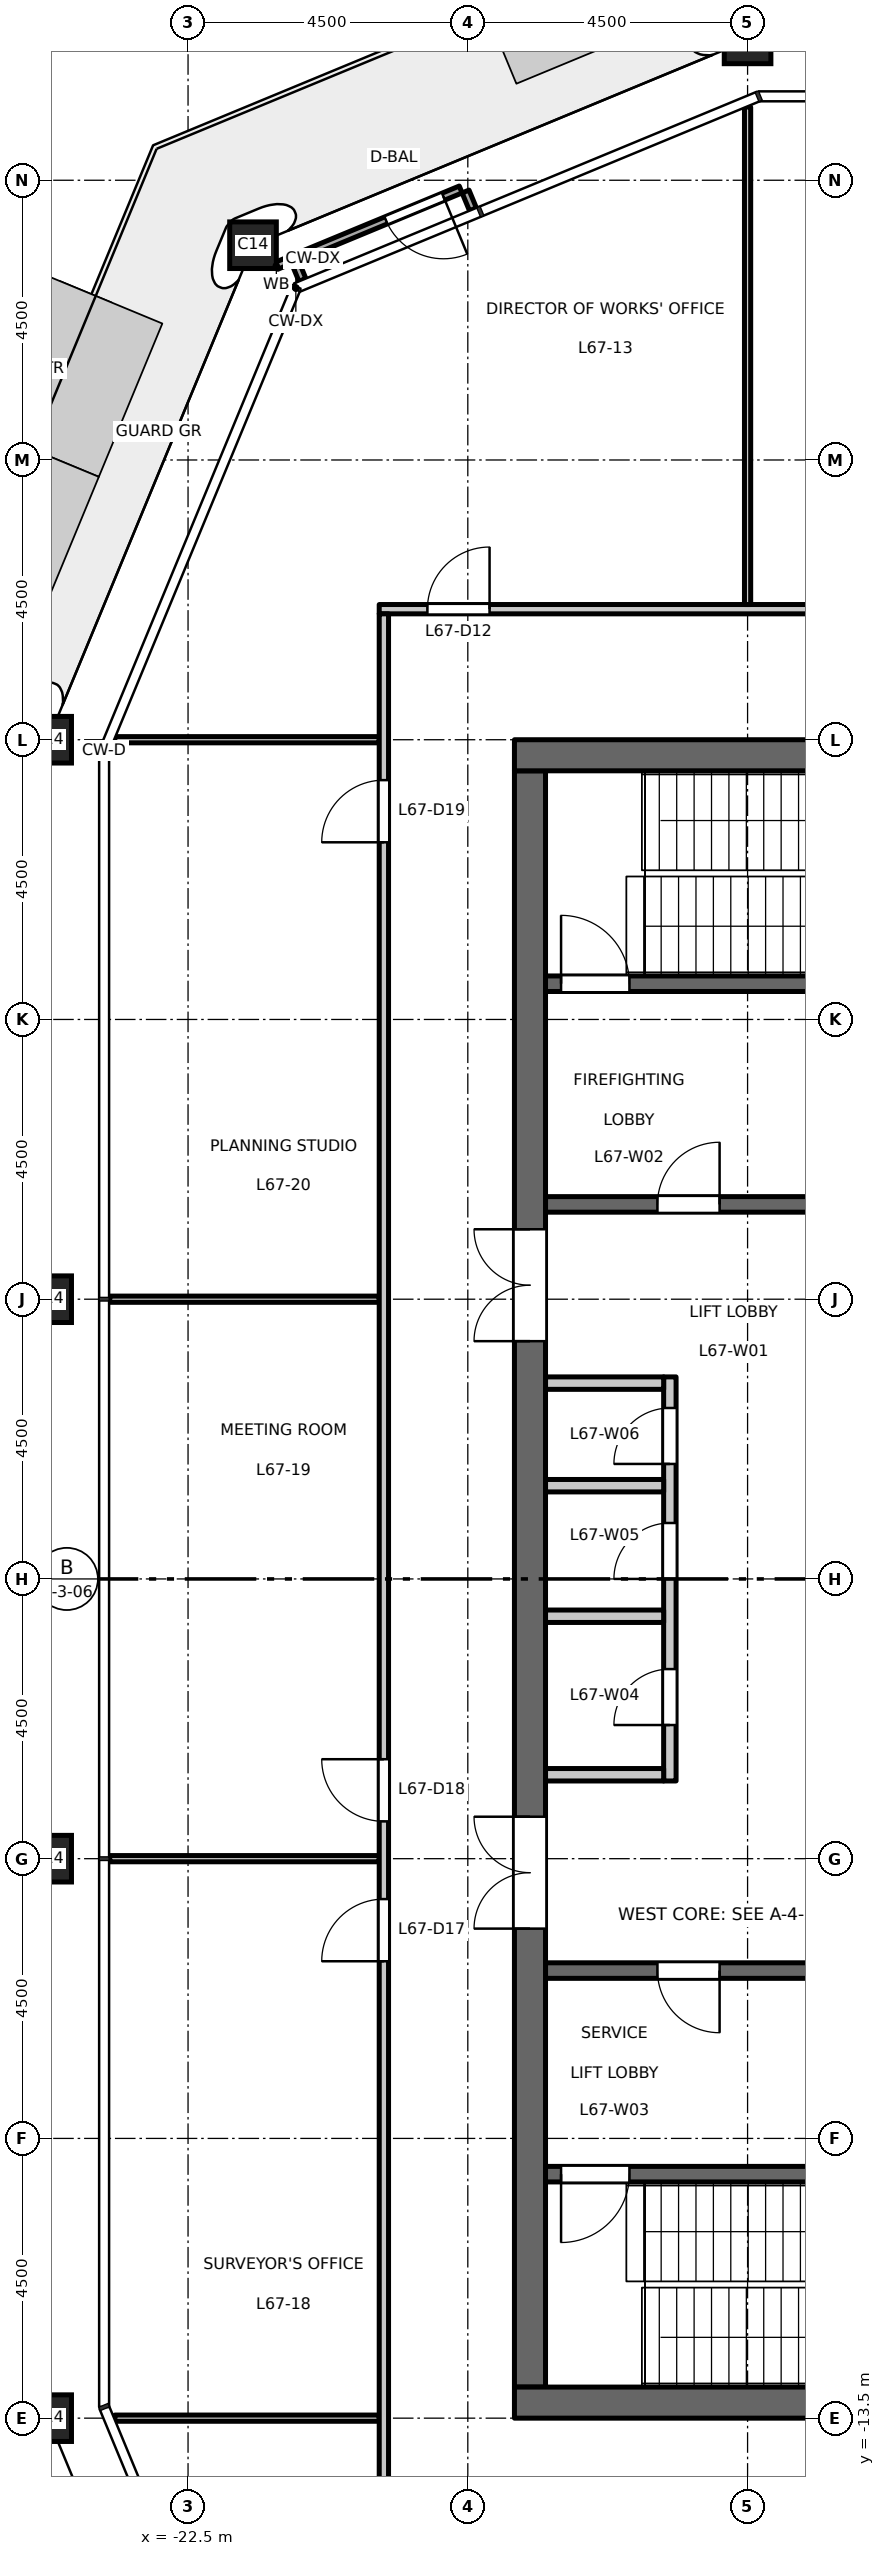
"""IFC4 building model, lengths in metres.
Left out: names, types, materials, properties, quantities, classifications, styles, units other than length and angle.
Written with IfcOpenShell. Run it as: python <this file> out.ifc"""

import sys

from ifc_helpers import new_model, si_unit, direction, frame, frame_2d, origin, origin_2d, place, context, subcontext, project, spatial, rectangle, hollow_rectangle, extrude, element, fill, save


model = new_model("IFC4")
c1 = context("Model", 3, precision=1e-05, world=origin(), true_north=direction((0.0, 1.0)))
c2 = subcontext(c1, "Body", "Model", "MODEL_VIEW")
j1 = project(units=[si_unit("LENGTHUNIT", "METRE"), si_unit("PLANEANGLEUNIT", "RADIAN")], contexts=[c1])
p1 = place(None, origin())
s1 = spatial("IfcSite", under=j1, at=p1, CompositionType="ELEMENT")
p2 = place(p1, origin())
s2 = spatial("IfcBuilding", under=s1, at=p2, CompositionType="ELEMENT")
p3 = place(p2, frame((0.0, 0.0, 312.2)))
s3 = spatial("IfcBuildingStorey", under=s2, at=p3, CompositionType="ELEMENT", Elevation=312.2)
for number, where, z_axis, x_axis in (
    (1, (-13.5, 24.75, 0.0), (0.0, 0.0, 1.0), (1.0, 0.0, 0.0)),
    (2, (-21.455, 21.455, 0.0), (0.0, 0.0, 1.0), (1.0, 0.0, 0.0)),
    (3, (-24.75, 13.5, 0.0), (0.0, 0.0, 1.0), (1.0, 0.0, 0.0)),
    (4, (-24.75, 4.5, 0.0), (0.0, 0.0, 1.0), (1.0, 0.0, 0.0)),
    (5, (-24.75, -4.5, 0.0), (0.0, 0.0, 1.0), (1.0, 0.0, 0.0)),
    (6, (-24.75, -13.5, 0.0), (0.0, 0.0, 1.0), (1.0, 0.0, 0.0)),
):
    element("IfcColumn", number, at=place(p3, frame(where, z_axis=z_axis, x_axis=x_axis)), inside=s3, PredefinedType="COLUMN", context=c2, shape_type="SweptSolid", body=[
        extrude(hollow_rectangle(XDim=0.75, YDim=0.75, WallThickness=0.04, at=origin_2d()), origin(), (0.0, 0.0, 1.0), 4.5),
    ])
p4 = place(p3, frame((-14.75, -3.25, 0.0), z_axis=(0.0, 0.0, 1.0), x_axis=(0.0, 1.0, 0.0)))
e7 = element("IfcWall", 7, at=p4, inside=s3, PredefinedType="PARTITIONING", context=c2, shape_type="SweptSolid", body=[
    extrude(rectangle(XDim=6.5, YDim=0.2, at=frame_2d((3.25, 0.0))), origin(), (0.0, 0.0, 1.0), 4.35),
])
p5 = place(p4, frame((0.9, 0.0, 0.0)))
e8 = element("IfcOpeningElement", 8, at=p5, cuts=e7, PredefinedType="OPENING", context=c2, shape_type="SweptSolid", body=[
    extrude(rectangle(XDim=0.9, YDim=2.1, at=frame_2d((0.45, 1.05))), frame((0.0, 0.11, 0.0), z_axis=(0.0, -1.0, 0.0), x_axis=(1.0, 0.0, 0.0)), (0.0, 0.0, 1.0), 0.22),
])
p6 = place(p4, frame((3.25, 0.0, 0.0)))
e9 = element("IfcOpeningElement", 9, at=p6, cuts=e7, PredefinedType="OPENING", context=c2, shape_type="SweptSolid", body=[
    extrude(rectangle(XDim=0.9, YDim=2.1, at=frame_2d((0.45, 1.05))), frame((0.0, 0.11, 0.0), z_axis=(0.0, -1.0, 0.0), x_axis=(1.0, 0.0, 0.0)), (0.0, 0.0, 1.0), 0.22),
])
p7 = place(p4, frame((5.1, 0.0, 0.0)))
e10 = element("IfcOpeningElement", 10, at=p7, cuts=e7, PredefinedType="OPENING", context=c2, shape_type="SweptSolid", body=[
    extrude(rectangle(XDim=0.9, YDim=2.1, at=frame_2d((0.45, 1.05))), frame((0.0, 0.11, 0.0), z_axis=(0.0, -1.0, 0.0), x_axis=(1.0, 0.0, 0.0)), (0.0, 0.0, 1.0), 0.22),
])
for number, where, z_axis, x_axis in (
    (11, (-14.85, 3.15, 0.0), (0.0, 0.0, 1.0), (-1.0, 0.0, 0.0)),
    (12, (-14.85, -3.15, 0.0), (0.0, 0.0, 1.0), (-1.0, 0.0, 0.0)),
    (13, (-14.85, -0.6, 0.0), (0.0, 0.0, 1.0), (-1.0, 0.0, 0.0)),
    (14, (-14.85, 1.5, 0.0), (0.0, 0.0, 1.0), (-1.0, 0.0, 0.0)),
):
    element("IfcWall", number, at=place(p3, frame(where, z_axis=z_axis, x_axis=x_axis)), inside=s3, PredefinedType="PARTITIONING", context=c2, shape_type="SweptSolid", body=[
        extrude(rectangle(XDim=1.9, YDim=0.2, at=frame_2d((0.95, 0.0))), origin(), (0.0, 0.0, 1.0), 4.35),
    ])
p8 = place(p3, frame((-12.15, 6.025, 0.0), z_axis=(0.0, 0.0, 1.0), x_axis=(-1.0, 0.0, 0.0)))
e15 = element("IfcWall", 15, at=p8, inside=s3, PredefinedType="SHEAR", context=c2, shape_type="SweptSolid", body=[
    extrude(rectangle(XDim=4.6, YDim=0.25, at=frame_2d((2.3, 0.0))), origin(), (0.0, 0.0, 1.0), 4.35),
])
p9 = place(p8, frame((1.8, 0.0, 0.0)))
e16 = element("IfcOpeningElement", 16, at=p9, cuts=e15, PredefinedType="OPENING", context=c2, shape_type="SweptSolid", body=[
    extrude(rectangle(XDim=1.0, YDim=2.1, at=frame_2d((0.5, 1.05))), frame((0.0, 0.135, 0.0), z_axis=(0.0, -1.0, 0.0), x_axis=(1.0, 0.0, 0.0)), (0.0, 0.0, 1.0), 0.27),
])
p10 = place(p3, frame((-12.15, -6.3, 0.0), z_axis=(0.0, 0.0, 1.0), x_axis=(-1.0, 0.0, 0.0)))
e17 = element("IfcWall", 17, at=p10, inside=s3, PredefinedType="SHEAR", context=c2, shape_type="SweptSolid", body=[
    extrude(rectangle(XDim=4.6, YDim=0.25, at=frame_2d((2.3, 0.0))), origin(), (0.0, 0.0, 1.0), 4.35),
])
p11 = place(p10, frame((1.8, 0.0, 0.0)))
e18 = element("IfcOpeningElement", 18, at=p11, cuts=e17, PredefinedType="OPENING", context=c2, shape_type="SweptSolid", body=[
    extrude(rectangle(XDim=1.0, YDim=2.1, at=frame_2d((0.5, 1.05))), frame((0.0, 0.135, 0.0), z_axis=(0.0, -1.0, 0.0), x_axis=(1.0, 0.0, 0.0)), (0.0, 0.0, 1.0), 0.27),
])
p12 = place(p3, frame((-17.0, -13.0, 0.0), z_axis=(0.0, 0.0, 1.0), x_axis=(0.0, 1.0, 0.0)))
e19 = element("IfcWall", 19, at=p12, inside=s3, PredefinedType="SHEAR", context=c2, shape_type="SweptSolid", body=[
    extrude(rectangle(XDim=26.0, YDim=0.5, at=frame_2d((13.0, 0.0))), origin(), (0.0, 0.0, 1.0), 4.35),
])
p13 = place(p12, frame((16.825, 0.0, 0.0)))
e20 = element("IfcOpeningElement", 20, at=p13, cuts=e19, PredefinedType="OPENING", context=c2, shape_type="SweptSolid", body=[
    extrude(rectangle(XDim=1.8, YDim=2.1, at=frame_2d((0.9, 1.05))), frame((0.0, 0.26, 0.0), z_axis=(0.0, -1.0, 0.0), x_axis=(1.0, 0.0, 0.0)), (0.0, 0.0, 1.0), 0.52),
])
p14 = place(p12, frame((7.375, 0.0, 0.0)))
e21 = element("IfcOpeningElement", 21, at=p14, cuts=e19, PredefinedType="OPENING", context=c2, shape_type="SweptSolid", body=[
    extrude(rectangle(XDim=1.8, YDim=2.1, at=frame_2d((0.9, 1.05))), frame((0.0, 0.26, 0.0), z_axis=(0.0, -1.0, 0.0), x_axis=(1.0, 0.0, 0.0)), (0.0, 0.0, 1.0), 0.52),
])
p15 = place(p3, frame((-8.75, 9.575, 0.0), z_axis=(0.0, 0.0, 1.0), x_axis=(-1.0, 0.0, 0.0)))
e22 = element("IfcWall", 22, at=p15, inside=s3, PredefinedType="SHEAR", context=c2, shape_type="SweptSolid", body=[
    extrude(rectangle(XDim=8.0, YDim=0.25, at=frame_2d((4.0, 0.0))), origin(), (0.0, 0.0, 1.0), 4.35),
])
p16 = place(p15, frame((6.65, 0.0, 0.0)))
e23 = element("IfcOpeningElement", 23, at=p16, cuts=e22, PredefinedType="OPENING", context=c2, shape_type="SweptSolid", body=[
    extrude(rectangle(XDim=1.1, YDim=2.1, at=frame_2d((0.55, 1.05))), frame((0.0, 0.135, 0.0), z_axis=(0.0, -1.0, 0.0), x_axis=(1.0, 0.0, 0.0)), (0.0, 0.0, 1.0), 0.27),
])
p17 = place(p3, frame((-8.75, -9.575, 0.0), z_axis=(0.0, 0.0, 1.0), x_axis=(-1.0, 0.0, 0.0)))
e24 = element("IfcWall", 24, at=p17, inside=s3, PredefinedType="SHEAR", context=c2, shape_type="SweptSolid", body=[
    extrude(rectangle(XDim=8.0, YDim=0.25, at=frame_2d((4.0, 0.0))), origin(), (0.0, 0.0, 1.0), 4.35),
])
p18 = place(p17, frame((6.65, 0.0, 0.0)))
e25 = element("IfcOpeningElement", 25, at=p18, cuts=e24, PredefinedType="OPENING", context=c2, shape_type="SweptSolid", body=[
    extrude(rectangle(XDim=1.1, YDim=2.1, at=frame_2d((0.55, 1.05))), frame((0.0, 0.135, 0.0), z_axis=(0.0, -1.0, 0.0), x_axis=(1.0, 0.0, 0.0)), (0.0, 0.0, 1.0), 0.27),
])
for number, where, z_axis, x_axis in (
    (26, (-8.25, 13.25, 0.0), (0.0, 0.0, 1.0), (-1.0, 0.0, 0.0)),
    (27, (-8.25, -13.25, 0.0), (0.0, 0.0, 1.0), (-1.0, 0.0, 0.0)),
):
    element("IfcWall", number, at=place(p3, frame(where, z_axis=z_axis, x_axis=x_axis)), inside=s3, PredefinedType="SHEAR", context=c2, shape_type="SweptSolid", body=[
        extrude(rectangle(XDim=9.0, YDim=0.5, at=frame_2d((4.5, 0.0))), origin(), (0.0, 0.0, 1.0), 4.35),
    ])
p19 = place(p3, frame((-17.917, 22.033, 0.0), z_axis=(0.0, 0.0, 1.0), x_axis=(-0.382769136873, 0.923844027884, 0.0)))
e28 = element("IfcWall", 28, at=p19, inside=s3, PredefinedType="STANDARD", context=c2, shape_type="SweptSolid", body=[
    extrude(rectangle(XDim=0.31, YDim=0.12, at=frame_2d((0.155, 0.0))), origin(), (0.0, 0.0, 1.0), 4.35),
])
p20 = place(p3, frame((-20.66, 20.896, 0.0), z_axis=(0.0, 0.0, 1.0), x_axis=(-0.382490814953, 0.923959293734, 0.0)))
e29 = element("IfcWall", 29, at=p20, inside=s3, PredefinedType="STANDARD", context=c2, shape_type="SweptSolid", body=[
    extrude(rectangle(XDim=0.31, YDim=0.12, at=frame_2d((0.155, 0.0))), origin(), (0.0, 0.0, 1.0), 4.35),
])
p21 = place(p3, frame((-18.115, 22.352, 0.0), z_axis=(0.0, 0.0, 1.0), x_axis=(-0.923880552517, -0.382680969843, 0.0)))
e30 = element("IfcWall", 30, at=p21, inside=s3, PredefinedType="STANDARD", context=c2, shape_type="SweptSolid", body=[
    extrude(rectangle(XDim=3.21, YDim=0.12, at=frame_2d((1.605, 0.0))), origin(), (0.0, 0.0, 1.0), 4.35),
])
p22 = place(p21, frame((0.3, 0.0, 0.0)))
e31 = element("IfcOpeningElement", 31, at=p22, cuts=e30, PredefinedType="OPENING", context=c2, shape_type="SweptSolid", body=[
    extrude(rectangle(XDim=1.0, YDim=2.4, at=frame_2d((0.5, 1.2))), frame((0.0, 0.07, 0.0), z_axis=(0.0, -1.0, 0.0), x_axis=(1.0, 0.0, 0.0)), (0.0, 0.0, 1.0), 0.14),
])
p23 = place(p3, frame((-23.678, -13.5, 0.0), z_axis=(0.0, 0.0, 1.0), x_axis=(1.0, 0.0, 0.0)))
e32 = element("IfcWall", 32, at=p23, inside=s3, PredefinedType="PARTITIONING", context=c2, shape_type="SweptSolid", body=[
    extrude(rectangle(XDim=4.253, YDim=0.1, at=frame_2d((2.126, 0.0))), origin(), (0.0, 0.0, 1.0), 4.35),
])
for number, where, z_axis, x_axis in (
    (33, (-23.76, -4.5, 0.0), (0.0, 0.0, 1.0), (1.0, 0.0, 0.0)),
    (34, (-23.76, 4.5, 0.0), (0.0, 0.0, 1.0), (1.0, 0.0, 0.0)),
):
    element("IfcWall", number, at=place(p3, frame(where, z_axis=z_axis, x_axis=x_axis)), inside=s3, PredefinedType="PARTITIONING", context=c2, shape_type="SweptSolid", body=[
        extrude(rectangle(XDim=4.335, YDim=0.1, at=frame_2d((2.167, 0.0))), origin(), (0.0, 0.0, 1.0), 4.35),
    ])
p24 = place(p3, frame((-23.678, 13.5, 0.0), z_axis=(0.0, 0.0, 1.0), x_axis=(1.0, 0.0, 0.0)))
e35 = element("IfcWall", 35, at=p24, inside=s3, PredefinedType="PARTITIONING", context=c2, shape_type="SweptSolid", body=[
    extrude(rectangle(XDim=4.253, YDim=0.1, at=frame_2d((2.126, 0.0))), origin(), (0.0, 0.0, 1.0), 4.35),
])
p25 = place(p3, frame((-19.425, 15.6, 0.0), z_axis=(0.0, 0.0, 1.0), x_axis=(1.0, 0.0, 0.0)))
e36 = element("IfcWall", 36, at=p25, inside=s3, PredefinedType="PARTITIONING", context=c2, shape_type="SweptSolid", body=[
    extrude(rectangle(XDim=38.85, YDim=0.15, at=frame_2d((19.425, 0.0))), origin(), (0.0, 0.0, 1.0), 4.35),
])
p26 = place(p25, frame((13.275, 0.0, 0.0)))
e37 = element("IfcOpeningElement", 37, at=p26, cuts=e36, PredefinedType="OPENING", context=c2, shape_type="SweptSolid", body=[
    extrude(rectangle(XDim=1.0, YDim=2.1, at=frame_2d((0.5, 1.05))), frame((0.0, 0.085, 0.0), z_axis=(0.0, -1.0, 0.0), x_axis=(1.0, 0.0, 0.0)), (0.0, 0.0, 1.0), 0.17),
])
p27 = place(p25, frame((15.525, 0.0, 0.0)))
e38 = element("IfcOpeningElement", 38, at=p27, cuts=e36, PredefinedType="OPENING", context=c2, shape_type="SweptSolid", body=[
    extrude(rectangle(XDim=1.0, YDim=2.1, at=frame_2d((0.5, 1.05))), frame((0.0, 0.085, 0.0), z_axis=(0.0, -1.0, 0.0), x_axis=(1.0, 0.0, 0.0)), (0.0, 0.0, 1.0), 0.17),
])
p28 = place(p25, frame((31.275, 0.0, 0.0)))
e39 = element("IfcOpeningElement", 39, at=p28, cuts=e36, PredefinedType="OPENING", context=c2, shape_type="SweptSolid", body=[
    extrude(rectangle(XDim=1.0, YDim=2.1, at=frame_2d((0.5, 1.05))), frame((0.0, 0.085, 0.0), z_axis=(0.0, -1.0, 0.0), x_axis=(1.0, 0.0, 0.0)), (0.0, 0.0, 1.0), 0.17),
])
p29 = place(p25, frame((0.775, 0.0, 0.0)))
e40 = element("IfcOpeningElement", 40, at=p29, cuts=e36, PredefinedType="OPENING", context=c2, shape_type="SweptSolid", body=[
    extrude(rectangle(XDim=1.0, YDim=2.1, at=frame_2d((0.5, 1.05))), frame((0.0, 0.085, 0.0), z_axis=(0.0, -1.0, 0.0), x_axis=(1.0, 0.0, 0.0)), (0.0, 0.0, 1.0), 0.17),
])
p30 = place(p3, frame((-19.35, -15.525, 0.0), z_axis=(0.0, 0.0, 1.0), x_axis=(0.0, 1.0, 0.0)))
e41 = element("IfcWall", 41, at=p30, inside=s3, PredefinedType="PARTITIONING", context=c2, shape_type="SweptSolid", body=[
    extrude(rectangle(XDim=31.05, YDim=0.15, at=frame_2d((15.525, 0.0))), origin(), (0.0, 0.0, 1.0), 4.35),
])
p31 = place(p30, frame((9.375, 0.0, 0.0)))
e42 = element("IfcOpeningElement", 42, at=p31, cuts=e41, PredefinedType="OPENING", context=c2, shape_type="SweptSolid", body=[
    extrude(rectangle(XDim=1.0, YDim=2.1, at=frame_2d((0.5, 1.05))), frame((0.0, 0.085, 0.0), z_axis=(0.0, -1.0, 0.0), x_axis=(1.0, 0.0, 0.0)), (0.0, 0.0, 1.0), 0.17),
])
p32 = place(p30, frame((11.625, 0.0, 0.0)))
e43 = element("IfcOpeningElement", 43, at=p32, cuts=e41, PredefinedType="OPENING", context=c2, shape_type="SweptSolid", body=[
    extrude(rectangle(XDim=1.0, YDim=2.1, at=frame_2d((0.5, 1.05))), frame((0.0, 0.085, 0.0), z_axis=(0.0, -1.0, 0.0), x_axis=(1.0, 0.0, 0.0)), (0.0, 0.0, 1.0), 0.17),
])
p33 = place(p30, frame((27.375, 0.0, 0.0)))
e44 = element("IfcOpeningElement", 44, at=p33, cuts=e41, PredefinedType="OPENING", context=c2, shape_type="SweptSolid", body=[
    extrude(rectangle(XDim=1.0, YDim=2.1, at=frame_2d((0.5, 1.05))), frame((0.0, 0.085, 0.0), z_axis=(0.0, -1.0, 0.0), x_axis=(1.0, 0.0, 0.0)), (0.0, 0.0, 1.0), 0.17),
])
p34 = place(p3, frame((-13.5, 15.675, 0.0), z_axis=(0.0, 0.0, 1.0), x_axis=(0.0, 1.0, 0.0)))
e45 = element("IfcWall", 45, at=p34, inside=s3, PredefinedType="PARTITIONING", context=c2, shape_type="SweptSolid", body=[
    extrude(rectangle(XDim=8.003, YDim=0.1, at=frame_2d((4.001, 0.0))), origin(), (0.0, 0.0, 1.0), 3.75),
])
p35 = place(p9, origin())
e46 = element("IfcDoor", 46, at=p35, inside=s3, OperationType="SINGLE_SWING_LEFT", PredefinedType="DOOR", context=c2, shape_type="SweptSolid", body=[
    extrude(rectangle(XDim=1.0, YDim=2.1, at=frame_2d((0.5, 1.05))), frame((0.0, 0.025, 0.0), z_axis=(0.0, -1.0, 0.0), x_axis=(1.0, 0.0, 0.0)), (0.0, 0.0, 1.0), 0.05),
])
fill(e16, e46)
p36 = place(p11, origin())
e47 = element("IfcDoor", 47, at=p36, inside=s3, OperationType="SINGLE_SWING_RIGHT", PredefinedType="DOOR", context=c2, shape_type="SweptSolid", body=[
    extrude(rectangle(XDim=1.0, YDim=2.1, at=frame_2d((0.5, 1.05))), frame((0.0, 0.025, 0.0), z_axis=(0.0, -1.0, 0.0), x_axis=(1.0, 0.0, 0.0)), (0.0, 0.0, 1.0), 0.05),
])
fill(e18, e47)
p37 = place(p16, origin())
e48 = element("IfcDoor", 48, at=p37, inside=s3, OperationType="SINGLE_SWING_RIGHT", PredefinedType="DOOR", context=c2, shape_type="SweptSolid", body=[
    extrude(rectangle(XDim=1.1, YDim=2.1, at=frame_2d((0.55, 1.05))), frame((0.0, 0.025, 0.0), z_axis=(0.0, -1.0, 0.0), x_axis=(1.0, 0.0, 0.0)), (0.0, 0.0, 1.0), 0.05),
])
fill(e23, e48)
p38 = place(p18, origin())
e49 = element("IfcDoor", 49, at=p38, inside=s3, OperationType="SINGLE_SWING_LEFT", PredefinedType="DOOR", context=c2, shape_type="SweptSolid", body=[
    extrude(rectangle(XDim=1.1, YDim=2.1, at=frame_2d((0.55, 1.05))), frame((0.0, 0.025, 0.0), z_axis=(0.0, -1.0, 0.0), x_axis=(1.0, 0.0, 0.0)), (0.0, 0.0, 1.0), 0.05),
])
fill(e25, e49)
p39 = place(p13, origin())
e50 = element("IfcDoor", 50, at=p39, inside=s3, OperationType="DOUBLE_DOOR_DOUBLE_SWING", PredefinedType="DOOR", context=c2, shape_type="SweptSolid", body=[
    extrude(rectangle(XDim=1.8, YDim=2.1, at=frame_2d((0.9, 1.05))), frame((0.0, 0.025, 0.0), z_axis=(0.0, -1.0, 0.0), x_axis=(1.0, 0.0, 0.0)), (0.0, 0.0, 1.0), 0.05),
])
fill(e20, e50)
p40 = place(p14, origin())
e51 = element("IfcDoor", 51, at=p40, inside=s3, OperationType="DOUBLE_DOOR_DOUBLE_SWING", PredefinedType="DOOR", context=c2, shape_type="SweptSolid", body=[
    extrude(rectangle(XDim=1.8, YDim=2.1, at=frame_2d((0.9, 1.05))), frame((0.0, 0.025, 0.0), z_axis=(0.0, -1.0, 0.0), x_axis=(1.0, 0.0, 0.0)), (0.0, 0.0, 1.0), 0.05),
])
fill(e21, e51)
p41 = place(p5, origin())
e52 = element("IfcDoor", 52, at=p41, inside=s3, OperationType="SINGLE_SWING_RIGHT", PredefinedType="DOOR", context=c2, shape_type="SweptSolid", body=[
    extrude(rectangle(XDim=0.9, YDim=2.1, at=frame_2d((0.45, 1.05))), frame((0.0, 0.025, 0.0), z_axis=(0.0, -1.0, 0.0), x_axis=(1.0, 0.0, 0.0)), (0.0, 0.0, 1.0), 0.05),
])
fill(e8, e52)
p42 = place(p6, origin())
e53 = element("IfcDoor", 53, at=p42, inside=s3, OperationType="SINGLE_SWING_RIGHT", PredefinedType="DOOR", context=c2, shape_type="SweptSolid", body=[
    extrude(rectangle(XDim=0.9, YDim=2.1, at=frame_2d((0.45, 1.05))), frame((0.0, 0.025, 0.0), z_axis=(0.0, -1.0, 0.0), x_axis=(1.0, 0.0, 0.0)), (0.0, 0.0, 1.0), 0.05),
])
fill(e9, e53)
p43 = place(p7, origin())
e54 = element("IfcDoor", 54, at=p43, inside=s3, OperationType="SINGLE_SWING_RIGHT", PredefinedType="DOOR", context=c2, shape_type="SweptSolid", body=[
    extrude(rectangle(XDim=0.9, YDim=2.1, at=frame_2d((0.45, 1.05))), frame((0.0, 0.025, 0.0), z_axis=(0.0, -1.0, 0.0), x_axis=(1.0, 0.0, 0.0)), (0.0, 0.0, 1.0), 0.05),
])
fill(e10, e54)
p44 = place(p22, origin())
e55 = element("IfcDoor", 55, at=p44, inside=s3, OperationType="SINGLE_SWING_LEFT", PredefinedType="DOOR", context=c2, shape_type="SweptSolid", body=[
    extrude(rectangle(XDim=1.0, YDim=2.4, at=frame_2d((0.5, 1.2))), frame((0.0, 0.025, 0.0), z_axis=(0.0, -1.0, 0.0), x_axis=(1.0, 0.0, 0.0)), (0.0, 0.0, 1.0), 0.05),
])
fill(e31, e55)
p45 = place(p29, origin())
e56 = element("IfcDoor", 56, at=p45, inside=s3, OperationType="SINGLE_SWING_RIGHT", PredefinedType="DOOR", context=c2, shape_type="SweptSolid", body=[
    extrude(rectangle(XDim=1.0, YDim=2.1, at=frame_2d((0.5, 1.05))), frame((0.0, 0.025, 0.0), z_axis=(0.0, -1.0, 0.0), x_axis=(1.0, 0.0, 0.0)), (0.0, 0.0, 1.0), 0.05),
])
fill(e40, e56)
p46 = place(p31, origin())
e57 = element("IfcDoor", 57, at=p46, inside=s3, OperationType="SINGLE_SWING_LEFT", PredefinedType="DOOR", context=c2, shape_type="SweptSolid", body=[
    extrude(rectangle(XDim=1.0, YDim=2.1, at=frame_2d((0.5, 1.05))), frame((0.0, 0.025, 0.0), z_axis=(0.0, -1.0, 0.0), x_axis=(1.0, 0.0, 0.0)), (0.0, 0.0, 1.0), 0.05),
])
fill(e42, e57)
p47 = place(p32, origin())
e58 = element("IfcDoor", 58, at=p47, inside=s3, OperationType="SINGLE_SWING_RIGHT", PredefinedType="DOOR", context=c2, shape_type="SweptSolid", body=[
    extrude(rectangle(XDim=1.0, YDim=2.1, at=frame_2d((0.5, 1.05))), frame((0.0, 0.025, 0.0), z_axis=(0.0, -1.0, 0.0), x_axis=(1.0, 0.0, 0.0)), (0.0, 0.0, 1.0), 0.05),
])
fill(e43, e58)
p48 = place(p33, origin())
e59 = element("IfcDoor", 59, at=p48, inside=s3, OperationType="SINGLE_SWING_LEFT", PredefinedType="DOOR", context=c2, shape_type="SweptSolid", body=[
    extrude(rectangle(XDim=1.0, YDim=2.1, at=frame_2d((0.5, 1.05))), frame((0.0, 0.025, 0.0), z_axis=(0.0, -1.0, 0.0), x_axis=(1.0, 0.0, 0.0)), (0.0, 0.0, 1.0), 0.05),
])
fill(e44, e59)
save(model, sys.argv[1])
